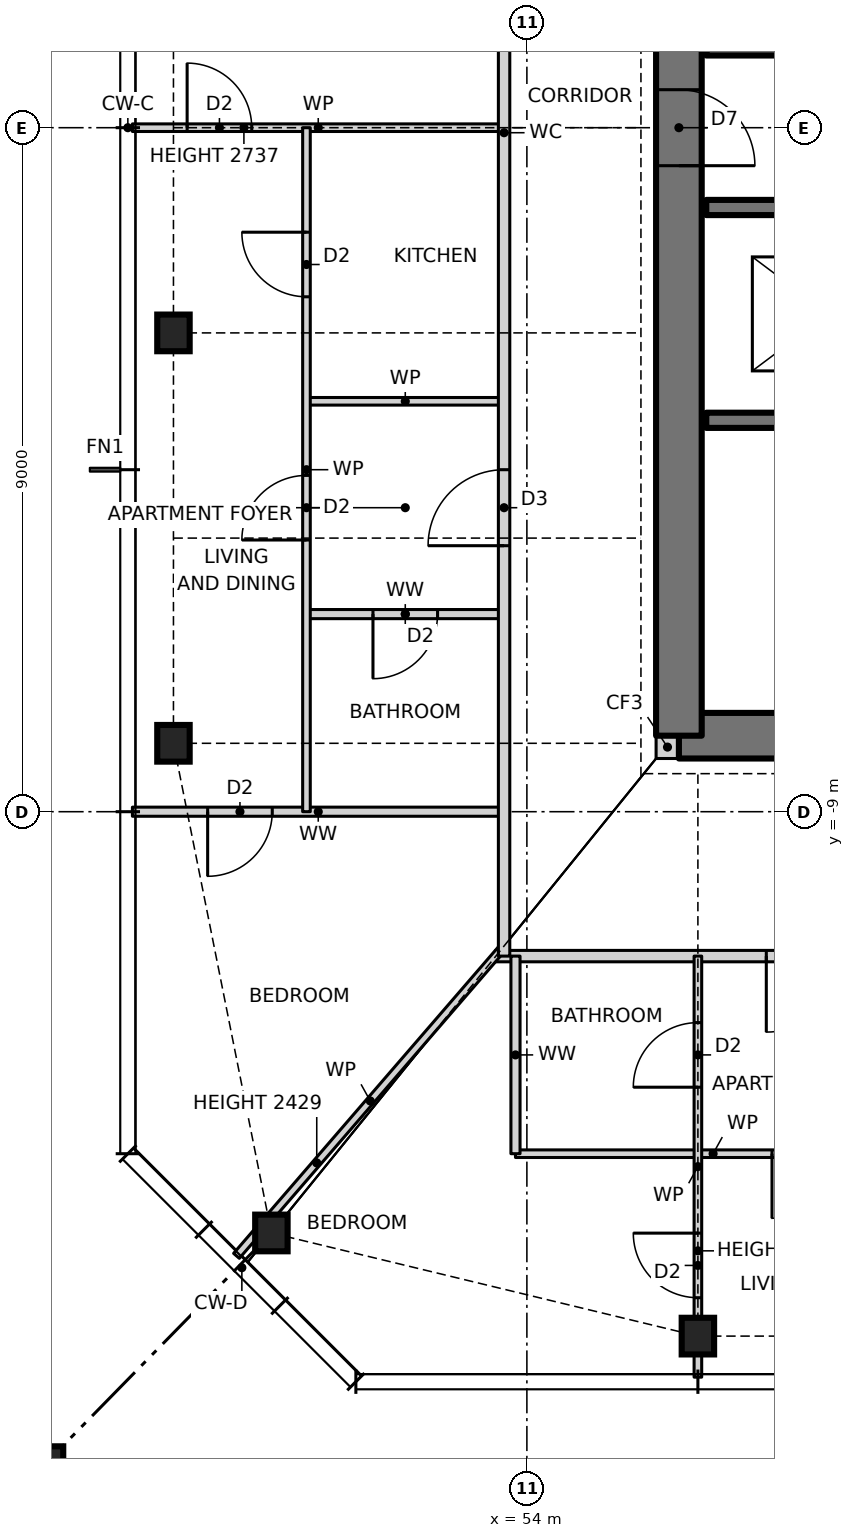
"""IFC4 building model, lengths in metres.
Left out: names, types, materials, properties, quantities, classifications, styles, units other than length and angle.
Written with IfcOpenShell. Run it as: python <this file> out.ifc"""

import sys

from ifc_helpers import new_model, si_unit, direction, frame, frame_2d, origin, origin_2d, place, context, subcontext, project, spatial, rectangle, hollow_rectangle, i_section, extrude, element, fill, save


model = new_model("IFC4")
c1 = context("Model", 3, precision=1e-05, world=origin(), true_north=direction((0.0, 1.0)))
c2 = subcontext(c1, "Body", "Model", "MODEL_VIEW")
j1 = project(units=[si_unit("LENGTHUNIT", "METRE"), si_unit("PLANEANGLEUNIT", "RADIAN")], contexts=[c1])
p1 = place(None, origin())
s1 = spatial("IfcSite", under=j1, at=p1, CompositionType="ELEMENT")
p2 = place(p1, origin())
s2 = spatial("IfcBuilding", under=s1, at=p2, CompositionType="ELEMENT")
p3 = place(p2, frame((0.0, 0.0, 84.0)))
s3 = spatial("IfcBuildingStorey", under=s2, at=p3, CompositionType="ELEMENT", Elevation=84.0)
for number, where, z_axis, x_axis in (
    (1, (50.639, -14.543, 0.0), (0.0, 0.0, 1.0), (1.0, 0.0, 0.0)),
    (2, (56.25, -15.9, 0.0), (0.0, 0.0, 1.0), (1.0, 0.0, 0.0)),
    (3, (49.35, -2.7, 0.0), (0.0, 0.0, 1.0), (1.0, 0.0, 0.0)),
    (4, (49.35, -8.1, 0.0), (0.0, 0.0, 1.0), (1.0, 0.0, 0.0)),
):
    element("IfcColumn", number, at=place(p3, frame(where, z_axis=z_axis, x_axis=x_axis)), inside=s3, PredefinedType="COLUMN", context=c2, shape_type="SweptSolid", body=[
        extrude(i_section(OverallWidth=0.427, OverallDepth=0.483, WebThickness=0.051, FlangeThickness=0.082, at=origin_2d()), origin(), (0.0, 0.0, 1.0), 3.5),
    ])
p4 = place(p3, frame((47.35, -17.9, 0.0), z_axis=(0.0, 0.0, 1.0), x_axis=(1.0, 0.0, 0.0)))
e5 = element("IfcColumn", 5, at=p4, inside=s3, PredefinedType="COLUMN", context=c2, shape_type="SweptSolid", body=[
    extrude(hollow_rectangle(XDim=1.1, YDim=1.1, WallThickness=0.06, at=origin_2d()), origin(), (0.0, 0.0, 1.0), 3.5),
])
p5 = place(p3, frame((55.7, -8.15, 0.0), z_axis=(0.0, 0.0, 1.0), x_axis=(1.0, 0.0, 0.0)))
e6 = element("IfcWall", 6, at=p5, inside=s3, PredefinedType="SOLIDWALL", context=c2, shape_type="SweptSolid", body=[
    extrude(rectangle(XDim=0.3, YDim=0.3, at=frame_2d((0.15, 0.0))), origin(), (0.0, 0.0, 1.0), 3.5),
])
p6 = place(p3, frame((56.0, -8.0, 0.0), z_axis=(0.0, 0.0, 1.0), x_axis=(1.0, 0.0, 0.0)))
e7 = element("IfcWall", 7, at=p6, inside=s3, PredefinedType="SHEAR", context=c2, shape_type="SweptSolid", body=[
    extrude(rectangle(XDim=14.0, YDim=0.6, at=frame_2d((7.0, 0.0))), origin(), (0.0, 0.0, 1.0), 3.5),
])
p7 = place(p6, frame((2.7, 0.0, 0.0)))
e8 = element("IfcOpeningElement", 8, at=p7, cuts=e7, PredefinedType="OPENING", context=c2, shape_type="SweptSolid", body=[
    extrude(rectangle(XDim=0.9, YDim=2.1, at=frame_2d((0.45, 1.05))), frame((0.0, 0.31, 0.0), z_axis=(0.0, -1.0, 0.0), x_axis=(1.0, 0.0, 0.0)), (0.0, 0.0, 1.0), 0.62),
])
p8 = place(p6, frame((7.7, 0.0, 0.0)))
e9 = element("IfcOpeningElement", 9, at=p8, cuts=e7, PredefinedType="OPENING", context=c2, shape_type="SweptSolid", body=[
    extrude(rectangle(XDim=0.9, YDim=2.1, at=frame_2d((0.45, 1.05))), frame((0.0, 0.31, 0.0), z_axis=(0.0, -1.0, 0.0), x_axis=(1.0, 0.0, 0.0)), (0.0, 0.0, 1.0), 0.62),
])
p9 = place(p3, frame((56.0, 8.0, 0.0), z_axis=(0.0, 0.0, 1.0), x_axis=(0.0, -1.0, 0.0)))
e10 = element("IfcWall", 10, at=p9, inside=s3, PredefinedType="SHEAR", context=c2, shape_type="SweptSolid", body=[
    extrude(rectangle(XDim=16.0, YDim=0.6, at=frame_2d((8.0, 0.0))), origin(), (0.0, 0.0, 1.0), 3.5),
])
p10 = place(p9, frame((7.5, 0.0, 0.0)))
e11 = element("IfcOpeningElement", 11, at=p10, cuts=e10, PredefinedType="OPENING", context=c2, shape_type="SweptSolid", body=[
    extrude(rectangle(XDim=1.0, YDim=2.1, at=frame_2d((0.5, 1.05))), frame((0.0, 0.31, 0.0), z_axis=(0.0, -1.0, 0.0), x_axis=(1.0, 0.0, 0.0)), (0.0, 0.0, 1.0), 0.62),
])
p11 = place(p3, frame((53.85, -13.5, 0.0), z_axis=(0.0, 0.0, 1.0), x_axis=(1.0, 0.0, 0.0)))
e12 = element("IfcWall", 12, at=p11, inside=s3, PredefinedType="PARTITIONING", context=c2, shape_type="SweptSolid", body=[
    extrude(rectangle(XDim=5.2, YDim=0.1, at=frame_2d((2.6, 0.0))), origin(), (0.0, 0.0, 1.0), 3.27),
])
p12 = place(p11, frame((3.375, 0.0, 0.0)))
e13 = element("IfcOpeningElement", 13, at=p12, cuts=e12, PredefinedType="OPENING", context=c2, shape_type="SweptSolid", body=[
    extrude(rectangle(XDim=0.85, YDim=2.1, at=frame_2d((0.425, 1.05))), frame((0.0, 0.06, 0.0), z_axis=(0.0, -1.0, 0.0), x_axis=(1.0, 0.0, 0.0)), (0.0, 0.0, 1.0), 0.12),
])
p13 = place(p3, frame((53.586, -10.9, 0.0), z_axis=(0.0, 0.0, 1.0), x_axis=(1.0, 0.0, 0.0)))
e14 = element("IfcWall", 14, at=p13, inside=s3, PredefinedType="PARTITIONING", context=c2, shape_type="SweptSolid", body=[
    extrude(rectangle(XDim=18.828, YDim=0.15, at=frame_2d((9.414, 0.0))), origin(), (0.0, 0.0, 1.0), 3.27),
])
p14 = place(p13, frame((3.564, 0.0, 0.0)))
e15 = element("IfcOpeningElement", 15, at=p14, cuts=e14, PredefinedType="OPENING", context=c2, shape_type="SweptSolid", body=[
    extrude(rectangle(XDim=1.0, YDim=2.1, at=frame_2d((0.5, 1.05))), frame((0.0, 0.085, 0.0), z_axis=(0.0, -1.0, 0.0), x_axis=(1.0, 0.0, 0.0)), (0.0, 0.0, 1.0), 0.17),
])
p15 = place(p13, frame((7.789, 0.0, 0.0)))
e16 = element("IfcOpeningElement", 16, at=p15, cuts=e14, PredefinedType="OPENING", context=c2, shape_type="SweptSolid", body=[
    extrude(rectangle(XDim=1.0, YDim=2.1, at=frame_2d((0.5, 1.05))), frame((0.0, 0.085, 0.0), z_axis=(0.0, -1.0, 0.0), x_axis=(1.0, 0.0, 0.0)), (0.0, 0.0, 1.0), 0.17),
])
p16 = place(p13, frame((12.564, 0.0, 0.0)))
e17 = element("IfcOpeningElement", 17, at=p16, cuts=e14, PredefinedType="OPENING", context=c2, shape_type="SweptSolid", body=[
    extrude(rectangle(XDim=1.0, YDim=2.1, at=frame_2d((0.5, 1.05))), frame((0.0, 0.085, 0.0), z_axis=(0.0, -1.0, 0.0), x_axis=(1.0, 0.0, 0.0)), (0.0, 0.0, 1.0), 0.17),
])
p17 = place(p3, frame((48.81, -9.0, 0.0), z_axis=(0.0, 0.0, 1.0), x_axis=(1.0, 0.0, 0.0)))
e18 = element("IfcWall", 18, at=p17, inside=s3, PredefinedType="PARTITIONING", context=c2, shape_type="SweptSolid", body=[
    extrude(rectangle(XDim=4.89, YDim=0.12, at=frame_2d((2.445, 0.0))), origin(), (0.0, 0.0, 1.0), 3.27),
])
p18 = place(p17, frame((0.99, 0.0, 0.0)))
e19 = element("IfcOpeningElement", 19, at=p18, cuts=e18, PredefinedType="OPENING", context=c2, shape_type="SweptSolid", body=[
    extrude(rectangle(XDim=0.85, YDim=2.1, at=frame_2d((0.425, 1.05))), frame((0.0, 0.07, 0.0), z_axis=(0.0, -1.0, 0.0), x_axis=(1.0, 0.0, 0.0)), (0.0, 0.0, 1.0), 0.14),
])
p19 = place(p3, frame((51.1, -6.4, 0.0), z_axis=(0.0, 0.0, 1.0), x_axis=(1.0, 0.0, 0.0)))
e20 = element("IfcWall", 20, at=p19, inside=s3, PredefinedType="PARTITIONING", context=c2, shape_type="SweptSolid", body=[
    extrude(rectangle(XDim=2.6, YDim=0.12, at=frame_2d((1.3, 0.0))), origin(), (0.0, 0.0, 1.0), 3.27),
])
p20 = place(p19, frame((0.875, 0.0, 0.0)))
e21 = element("IfcOpeningElement", 21, at=p20, cuts=e20, PredefinedType="OPENING", context=c2, shape_type="SweptSolid", body=[
    extrude(rectangle(XDim=0.85, YDim=2.1, at=frame_2d((0.425, 1.05))), frame((0.0, 0.07, 0.0), z_axis=(0.0, -1.0, 0.0), x_axis=(1.0, 0.0, 0.0)), (0.0, 0.0, 1.0), 0.14),
])
p21 = place(p3, frame((56.36, -3.85, 0.0), z_axis=(0.0, 0.0, 1.0), x_axis=(1.0, 0.0, 0.0)))
e22 = element("IfcWall", 22, at=p21, inside=s3, PredefinedType="SOLIDWALL", context=c2, shape_type="SweptSolid", body=[
    extrude(rectangle(XDim=9.94, YDim=0.2, at=frame_2d((4.97, 0.0))), origin(), (0.0, 0.0, 1.0), 3.5),
])
p22 = place(p3, frame((51.1, -3.6, 0.0), z_axis=(0.0, 0.0, 1.0), x_axis=(1.0, 0.0, 0.0)))
e23 = element("IfcWall", 23, at=p22, inside=s3, PredefinedType="PARTITIONING", context=c2, shape_type="SweptSolid", body=[
    extrude(rectangle(XDim=2.6, YDim=0.1, at=frame_2d((1.3, 0.0))), origin(), (0.0, 0.0, 1.0), 3.27),
])
p23 = place(p3, frame((56.36, -1.05, 0.0), z_axis=(0.0, 0.0, 1.0), x_axis=(1.0, 0.0, 0.0)))
e24 = element("IfcWall", 24, at=p23, inside=s3, PredefinedType="SOLIDWALL", context=c2, shape_type="SweptSolid", body=[
    extrude(rectangle(XDim=13.28, YDim=0.2, at=frame_2d((6.64, 0.0))), origin(), (0.0, 0.0, 1.0), 3.5),
])
p24 = place(p23, frame((11.11, 0.0, 0.0)))
e25 = element("IfcOpeningElement", 25, at=p24, cuts=e24, PredefinedType="OPENING", context=c2, shape_type="SweptSolid", body=[
    extrude(rectangle(XDim=1.0, YDim=2.1, at=frame_2d((0.5, 1.05))), frame((0.0, 0.11, 0.0), z_axis=(0.0, -1.0, 0.0), x_axis=(1.0, 0.0, 0.0)), (0.0, 0.0, 1.0), 0.22),
])
p25 = place(p23, frame((1.087, 0.0, 0.0)))
e26 = element("IfcOpeningElement", 26, at=p25, cuts=e24, PredefinedType="OPENING", context=c2, shape_type="SweptSolid", body=[
    extrude(rectangle(XDim=1.1, YDim=2.1, at=frame_2d((0.55, 1.05))), frame((0.0, 0.11, 0.0), z_axis=(0.0, -1.0, 0.0), x_axis=(1.0, 0.0, 0.0)), (0.0, 0.0, 1.0), 0.22),
])
p26 = place(p23, frame((4.39, 0.0, 0.0)))
e27 = element("IfcOpeningElement", 27, at=p26, cuts=e24, PredefinedType="OPENING", context=c2, shape_type="SweptSolid", body=[
    extrude(rectangle(XDim=1.1, YDim=2.1, at=frame_2d((0.55, 1.05))), frame((0.0, 0.11, 0.0), z_axis=(0.0, -1.0, 0.0), x_axis=(1.0, 0.0, 0.0)), (0.0, 0.0, 1.0), 0.22),
])
p27 = place(p23, frame((7.724, 0.0, 0.0)))
e28 = element("IfcOpeningElement", 28, at=p27, cuts=e24, PredefinedType="OPENING", context=c2, shape_type="SweptSolid", body=[
    extrude(rectangle(XDim=1.1, YDim=2.1, at=frame_2d((0.55, 1.05))), frame((0.0, 0.11, 0.0), z_axis=(0.0, -1.0, 0.0), x_axis=(1.0, 0.0, 0.0)), (0.0, 0.0, 1.0), 0.22),
])
p28 = place(p3, frame((48.81, 0.0, 0.0), z_axis=(0.0, 0.0, 1.0), x_axis=(1.0, 0.0, 0.0)))
e29 = element("IfcWall", 29, at=p28, inside=s3, PredefinedType="PARTITIONING", context=c2, shape_type="SweptSolid", body=[
    extrude(rectangle(XDim=4.89, YDim=0.1, at=frame_2d((2.445, 0.0))), origin(), (0.0, 0.0, 1.0), 2.737),
])
p29 = place(p28, frame((0.72, 0.0, 0.0)))
e30 = element("IfcOpeningElement", 30, at=p29, cuts=e29, PredefinedType="OPENING", context=c2, shape_type="SweptSolid", body=[
    extrude(rectangle(XDim=0.85, YDim=2.1, at=frame_2d((0.425, 1.05))), frame((0.0, 0.06, 0.0), z_axis=(0.0, -1.0, 0.0), x_axis=(1.0, 0.0, 0.0)), (0.0, 0.0, 1.0), 0.12),
])
p30 = place(p3, frame((56.36, 1.05, 0.0), z_axis=(0.0, 0.0, 1.0), x_axis=(1.0, 0.0, 0.0)))
e31 = element("IfcWall", 31, at=p30, inside=s3, PredefinedType="SOLIDWALL", context=c2, shape_type="SweptSolid", body=[
    extrude(rectangle(XDim=13.28, YDim=0.2, at=frame_2d((6.64, 0.0))), origin(), (0.0, 0.0, 1.0), 3.5),
])
p31 = place(p30, frame((1.17, 0.0, 0.0)))
e32 = element("IfcOpeningElement", 32, at=p31, cuts=e31, PredefinedType="OPENING", context=c2, shape_type="SweptSolid", body=[
    extrude(rectangle(XDim=1.0, YDim=2.1, at=frame_2d((0.5, 1.05))), frame((0.0, 0.11, 0.0), z_axis=(0.0, -1.0, 0.0), x_axis=(1.0, 0.0, 0.0)), (0.0, 0.0, 1.0), 0.22),
])
p32 = place(p30, frame((7.54, 0.0, 0.0)))
e33 = element("IfcOpeningElement", 33, at=p32, cuts=e31, PredefinedType="OPENING", context=c2, shape_type="SweptSolid", body=[
    extrude(rectangle(XDim=0.9, YDim=2.1, at=frame_2d((0.45, 1.05))), frame((0.0, 0.11, 0.0), z_axis=(0.0, -1.0, 0.0), x_axis=(1.0, 0.0, 0.0)), (0.0, 0.0, 1.0), 0.22),
])
p33 = place(p30, frame((4.24, 0.0, 0.0)))
e34 = element("IfcOpeningElement", 34, at=p33, cuts=e31, PredefinedType="OPENING", context=c2, shape_type="SweptSolid", body=[
    extrude(rectangle(XDim=0.9, YDim=2.1, at=frame_2d((0.45, 1.05))), frame((0.0, 0.11, 0.0), z_axis=(0.0, -1.0, 0.0), x_axis=(1.0, 0.0, 0.0)), (0.0, 0.0, 1.0), 0.22),
])
p34 = place(p30, frame((10.96, 0.0, 0.0)))
e35 = element("IfcOpeningElement", 35, at=p34, cuts=e31, PredefinedType="OPENING", context=c2, shape_type="SweptSolid", body=[
    extrude(rectangle(XDim=1.3, YDim=2.1, at=frame_2d((0.65, 1.05))), frame((0.0, 0.11, 0.0), z_axis=(0.0, -1.0, 0.0), x_axis=(1.0, 0.0, 0.0)), (0.0, 0.0, 1.0), 0.22),
])
p35 = place(p3, frame((50.179, -14.844, 0.0), z_axis=(0.0, 0.0, 1.0), x_axis=(0.653713095188, 0.756742485381, 0.0)))
e36 = element("IfcWall", 36, at=p35, inside=s3, PredefinedType="PARTITIONING", context=c2, shape_type="SweptSolid", body=[
    extrude(rectangle(XDim=5.386, YDim=0.1, at=frame_2d((2.693, 0.0))), origin(), (0.0, 0.0, 1.0), 2.429),
])
p36 = place(p3, frame((56.25, -16.44, 0.0), z_axis=(0.0, 0.0, 1.0), x_axis=(0.0, 1.0, 0.0)))
e37 = element("IfcWall", 37, at=p36, inside=s3, PredefinedType="PARTITIONING", context=c2, shape_type="SweptSolid", body=[
    extrude(rectangle(XDim=5.54, YDim=0.1, at=frame_2d((2.77, 0.0))), origin(), (0.0, 0.0, 1.0), 2.587),
])
p37 = place(p36, frame((3.815, 0.0, 0.0)))
e38 = element("IfcOpeningElement", 38, at=p37, cuts=e37, PredefinedType="OPENING", context=c2, shape_type="SweptSolid", body=[
    extrude(rectangle(XDim=0.85, YDim=2.1, at=frame_2d((0.425, 1.05))), frame((0.0, 0.06, 0.0), z_axis=(0.0, -1.0, 0.0), x_axis=(1.0, 0.0, 0.0)), (0.0, 0.0, 1.0), 0.12),
])
p38 = place(p36, frame((1.045, 0.0, 0.0)))
e39 = element("IfcOpeningElement", 39, at=p38, cuts=e37, PredefinedType="OPENING", context=c2, shape_type="SweptSolid", body=[
    extrude(rectangle(XDim=0.85, YDim=2.1, at=frame_2d((0.425, 1.05))), frame((0.0, 0.06, 0.0), z_axis=(0.0, -1.0, 0.0), x_axis=(1.0, 0.0, 0.0)), (0.0, 0.0, 1.0), 0.12),
])
p39 = place(p3, frame((53.85, -13.5, 0.0), z_axis=(0.0, 0.0, 1.0), x_axis=(0.0, 1.0, 0.0)))
e40 = element("IfcWall", 40, at=p39, inside=s3, PredefinedType="PARTITIONING", context=c2, shape_type="SweptSolid", body=[
    extrude(rectangle(XDim=2.6, YDim=0.12, at=frame_2d((1.3, 0.0))), origin(), (0.0, 0.0, 1.0), 3.27),
])
p40 = place(p3, frame((53.7, -10.9, 0.0), z_axis=(0.0, 0.0, 1.0), x_axis=(0.0, 1.0, 0.0)))
e41 = element("IfcWall", 41, at=p40, inside=s3, PredefinedType="PARTITIONING", context=c2, shape_type="SweptSolid", body=[
    extrude(rectangle(XDim=21.668, YDim=0.15, at=frame_2d((10.834, 0.0))), origin(), (0.0, 0.0, 1.0), 3.27),
])
p41 = place(p40, frame((18.0, 0.0, 0.0)))
e42 = element("IfcOpeningElement", 42, at=p41, cuts=e41, PredefinedType="OPENING", context=c2, shape_type="SweptSolid", body=[
    extrude(rectangle(XDim=1.0, YDim=2.1, at=frame_2d((0.5, 1.05))), frame((0.0, 0.085, 0.0), z_axis=(0.0, -1.0, 0.0), x_axis=(1.0, 0.0, 0.0)), (0.0, 0.0, 1.0), 0.17),
])
p42 = place(p40, frame((5.4, 0.0, 0.0)))
e43 = element("IfcOpeningElement", 43, at=p42, cuts=e41, PredefinedType="OPENING", context=c2, shape_type="SweptSolid", body=[
    extrude(rectangle(XDim=1.0, YDim=2.1, at=frame_2d((0.5, 1.05))), frame((0.0, 0.085, 0.0), z_axis=(0.0, -1.0, 0.0), x_axis=(1.0, 0.0, 0.0)), (0.0, 0.0, 1.0), 0.17),
])
p43 = place(p3, frame((51.1, -9.0, 0.0), z_axis=(0.0, 0.0, 1.0), x_axis=(0.0, 1.0, 0.0)))
e44 = element("IfcWall", 44, at=p43, inside=s3, PredefinedType="PARTITIONING", context=c2, shape_type="SweptSolid", body=[
    extrude(rectangle(XDim=9.0, YDim=0.1, at=frame_2d((4.5, 0.0))), origin(), (0.0, 0.0, 1.0), 3.27),
])
p44 = place(p43, frame((6.775, 0.0, 0.0)))
e45 = element("IfcOpeningElement", 45, at=p44, cuts=e44, PredefinedType="OPENING", context=c2, shape_type="SweptSolid", body=[
    extrude(rectangle(XDim=0.85, YDim=2.1, at=frame_2d((0.425, 1.05))), frame((0.0, 0.06, 0.0), z_axis=(0.0, -1.0, 0.0), x_axis=(1.0, 0.0, 0.0)), (0.0, 0.0, 1.0), 0.12),
])
p45 = place(p43, frame((3.575, 0.0, 0.0)))
e46 = element("IfcOpeningElement", 46, at=p45, cuts=e44, PredefinedType="OPENING", context=c2, shape_type="SweptSolid", body=[
    extrude(rectangle(XDim=0.85, YDim=2.1, at=frame_2d((0.425, 1.05))), frame((0.0, 0.06, 0.0), z_axis=(0.0, -1.0, 0.0), x_axis=(1.0, 0.0, 0.0)), (0.0, 0.0, 1.0), 0.12),
])
p46 = place(p14, frame((1.0, 0.0, 0.0), z_axis=(0.0, 0.0, 1.0), x_axis=(-1.0, 0.0, 0.0)))
e47 = element("IfcDoor", 47, at=p46, inside=s3, OperationType="SINGLE_SWING_RIGHT", PredefinedType="DOOR", context=c2, shape_type="SweptSolid", body=[
    extrude(rectangle(XDim=1.0, YDim=2.1, at=frame_2d((0.5, 1.05))), frame((0.0, 0.025, 0.0), z_axis=(0.0, -1.0, 0.0), x_axis=(1.0, 0.0, 0.0)), (0.0, 0.0, 1.0), 0.05),
])
fill(e15, e47)
p47 = place(p12, frame((0.85, 0.0, 0.0), z_axis=(0.0, 0.0, 1.0), x_axis=(-1.0, 0.0, 0.0)))
e48 = element("IfcDoor", 48, at=p47, inside=s3, OperationType="SINGLE_SWING_RIGHT", PredefinedType="DOOR", context=c2, shape_type="SweptSolid", body=[
    extrude(rectangle(XDim=0.85, YDim=2.1, at=frame_2d((0.425, 1.05))), frame((0.0, 0.025, 0.0), z_axis=(0.0, -1.0, 0.0), x_axis=(1.0, 0.0, 0.0)), (0.0, 0.0, 1.0), 0.05),
])
fill(e13, e48)
p48 = place(p37, origin())
e49 = element("IfcDoor", 49, at=p48, inside=s3, OperationType="SINGLE_SWING_LEFT", PredefinedType="DOOR", context=c2, shape_type="SweptSolid", body=[
    extrude(rectangle(XDim=0.85, YDim=2.1, at=frame_2d((0.425, 1.05))), frame((0.0, 0.025, 0.0), z_axis=(0.0, -1.0, 0.0), x_axis=(1.0, 0.0, 0.0)), (0.0, 0.0, 1.0), 0.05),
])
fill(e38, e49)
p49 = place(p38, origin())
e50 = element("IfcDoor", 50, at=p49, inside=s3, OperationType="SINGLE_SWING_RIGHT", PredefinedType="DOOR", context=c2, shape_type="SweptSolid", body=[
    extrude(rectangle(XDim=0.85, YDim=2.1, at=frame_2d((0.425, 1.05))), frame((0.0, 0.025, 0.0), z_axis=(0.0, -1.0, 0.0), x_axis=(1.0, 0.0, 0.0)), (0.0, 0.0, 1.0), 0.05),
])
fill(e39, e50)
p50 = place(p44, origin())
e51 = element("IfcDoor", 51, at=p50, inside=s3, OperationType="SINGLE_SWING_RIGHT", PredefinedType="DOOR", context=c2, shape_type="SweptSolid", body=[
    extrude(rectangle(XDim=0.85, YDim=2.1, at=frame_2d((0.425, 1.05))), frame((0.0, 0.025, 0.0), z_axis=(0.0, -1.0, 0.0), x_axis=(1.0, 0.0, 0.0)), (0.0, 0.0, 1.0), 0.05),
])
fill(e45, e51)
p51 = place(p42, origin())
e52 = element("IfcDoor", 52, at=p51, inside=s3, OperationType="SINGLE_SWING_LEFT", PredefinedType="DOOR", context=c2, shape_type="SweptSolid", body=[
    extrude(rectangle(XDim=1.0, YDim=2.1, at=frame_2d((0.5, 1.05))), frame((0.0, 0.025, 0.0), z_axis=(0.0, -1.0, 0.0), x_axis=(1.0, 0.0, 0.0)), (0.0, 0.0, 1.0), 0.05),
])
fill(e43, e52)
p52 = place(p45, origin())
e53 = element("IfcDoor", 53, at=p52, inside=s3, OperationType="SINGLE_SWING_LEFT", PredefinedType="DOOR", context=c2, shape_type="SweptSolid", body=[
    extrude(rectangle(XDim=0.85, YDim=2.1, at=frame_2d((0.425, 1.05))), frame((0.0, 0.025, 0.0), z_axis=(0.0, -1.0, 0.0), x_axis=(1.0, 0.0, 0.0)), (0.0, 0.0, 1.0), 0.05),
])
fill(e46, e53)
p53 = place(p20, frame((0.85, 0.0, 0.0), z_axis=(0.0, 0.0, 1.0), x_axis=(-1.0, 0.0, 0.0)))
e54 = element("IfcDoor", 54, at=p53, inside=s3, OperationType="SINGLE_SWING_RIGHT", PredefinedType="DOOR", context=c2, shape_type="SweptSolid", body=[
    extrude(rectangle(XDim=0.85, YDim=2.1, at=frame_2d((0.425, 1.05))), frame((0.0, 0.025, 0.0), z_axis=(0.0, -1.0, 0.0), x_axis=(1.0, 0.0, 0.0)), (0.0, 0.0, 1.0), 0.05),
])
fill(e21, e54)
p54 = place(p29, origin())
e55 = element("IfcDoor", 55, at=p54, inside=s3, OperationType="SINGLE_SWING_LEFT", PredefinedType="DOOR", context=c2, shape_type="SweptSolid", body=[
    extrude(rectangle(XDim=0.85, YDim=2.1, at=frame_2d((0.425, 1.05))), frame((0.0, 0.025, 0.0), z_axis=(0.0, -1.0, 0.0), x_axis=(1.0, 0.0, 0.0)), (0.0, 0.0, 1.0), 0.05),
])
fill(e30, e55)
p55 = place(p18, frame((0.85, 0.0, 0.0), z_axis=(0.0, 0.0, 1.0), x_axis=(-1.0, 0.0, 0.0)))
e56 = element("IfcDoor", 56, at=p55, inside=s3, OperationType="SINGLE_SWING_RIGHT", PredefinedType="DOOR", context=c2, shape_type="SweptSolid", body=[
    extrude(rectangle(XDim=0.85, YDim=2.1, at=frame_2d((0.425, 1.05))), frame((0.0, 0.025, 0.0), z_axis=(0.0, -1.0, 0.0), x_axis=(1.0, 0.0, 0.0)), (0.0, 0.0, 1.0), 0.05),
])
fill(e19, e56)
p56 = place(p10, origin())
e57 = element("IfcDoor", 57, at=p56, inside=s3, OperationType="SINGLE_SWING_RIGHT", PredefinedType="DOOR", context=c2, shape_type="SweptSolid", body=[
    extrude(rectangle(XDim=1.0, YDim=2.1, at=frame_2d((0.5, 1.05))), frame((0.0, 0.025, 0.0), z_axis=(0.0, -1.0, 0.0), x_axis=(1.0, 0.0, 0.0)), (0.0, 0.0, 1.0), 0.05),
])
fill(e11, e57)
save(model, sys.argv[1])
